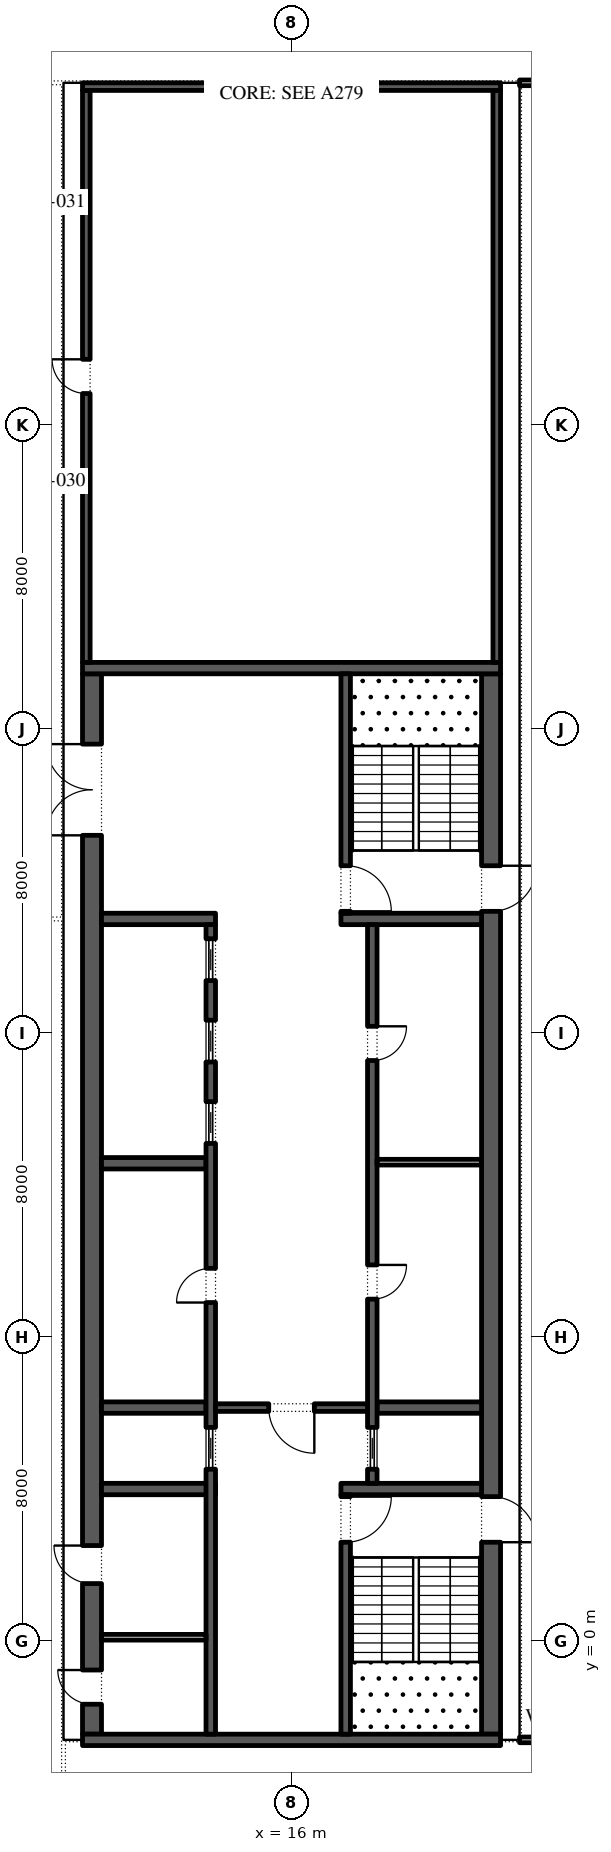
"""IFC4 building model, lengths in metres.
Left out: names, types, materials, properties, quantities, classifications, styles, units other than length and angle.
Written with IfcOpenShell. Run it as: python <this file> out.ifc"""

import sys

from ifc_helpers import new_model, si_unit, direction, frame, frame_2d, origin, place, context, subcontext, project, spatial, rectangle, extrude, element, fill, save


model = new_model("IFC4")
c1 = context("Model", 3, precision=1e-05, world=origin(), true_north=direction((0.0, 1.0)))
c2 = subcontext(c1, "Body", "Model", "MODEL_VIEW")
j1 = project(units=[si_unit("LENGTHUNIT", "METRE"), si_unit("PLANEANGLEUNIT", "RADIAN")], contexts=[c1])
p1 = place(None, origin())
s1 = spatial("IfcSite", under=j1, at=p1, CompositionType="ELEMENT")
p2 = place(p1, origin())
s2 = spatial("IfcBuilding", under=s1, at=p2, CompositionType="ELEMENT")
p3 = place(p2, frame((0.0, 0.0, 346.8)))
s3 = spatial("IfcBuildingStorey", under=s2, at=p3, CompositionType="ELEMENT", Elevation=346.8)
p4 = place(p3, frame((21.25, -2.45, 0.0), z_axis=(0.0, 0.0, 1.0), x_axis=(0.0, 1.0, 0.0)))
e1 = element("IfcWall", 1, at=p4, inside=s3, PredefinedType="SHEAR", context=c2, shape_type="SweptSolid", body=[
    extrude(rectangle(XDim=27.9, YDim=0.5, at=frame_2d((13.95, 0.0))), origin(), (0.0, 0.0, 1.0), 4.0),
])
p5 = place(p4, frame((5.05, 0.0, 0.0)))
e2 = element("IfcOpeningElement", 2, at=p5, cuts=e1, PredefinedType="OPENING", context=c2, shape_type="SweptSolid", body=[
    extrude(rectangle(XDim=1.2, YDim=2.1, at=frame_2d((0.6, 1.05))), frame((0.0, 0.26, 0.0), z_axis=(0.0, -1.0, 0.0), x_axis=(1.0, 0.0, 0.0)), (0.0, 0.0, 1.0), 0.52),
])
p6 = place(p4, frame((21.65, 0.0, 0.0)))
e3 = element("IfcOpeningElement", 3, at=p6, cuts=e1, PredefinedType="OPENING", context=c2, shape_type="SweptSolid", body=[
    extrude(rectangle(XDim=1.2, YDim=2.1, at=frame_2d((0.6, 1.05))), frame((0.0, 0.26, 0.0), z_axis=(0.0, -1.0, 0.0), x_axis=(1.0, 0.0, 0.0)), (0.0, 0.0, 1.0), 0.52),
])
p7 = place(p3, frame((10.75, -2.45, 0.0), z_axis=(0.0, 0.0, 1.0), x_axis=(0.0, 1.0, 0.0)))
e4 = element("IfcWall", 4, at=p7, inside=s3, PredefinedType="SHEAR", context=c2, shape_type="SweptSolid", body=[
    extrude(rectangle(XDim=27.9, YDim=0.5, at=frame_2d((13.95, 0.0))), origin(), (0.0, 0.0, 1.0), 4.0),
])
p8 = place(p7, frame((23.65, 0.0, 0.0)))
e5 = element("IfcOpeningElement", 5, at=p8, cuts=e4, PredefinedType="OPENING", context=c2, shape_type="SweptSolid", body=[
    extrude(rectangle(XDim=2.4, YDim=2.1, at=frame_2d((1.2, 1.05))), frame((0.0, 0.26, 0.0), z_axis=(0.0, -1.0, 0.0), x_axis=(1.0, 0.0, 0.0)), (0.0, 0.0, 1.0), 0.52),
])
p9 = place(p7, frame((0.788, 0.0, 0.0)))
e6 = element("IfcOpeningElement", 6, at=p9, cuts=e4, PredefinedType="OPENING", context=c2, shape_type="SweptSolid", body=[
    extrude(rectangle(XDim=0.9, YDim=2.1, at=frame_2d((0.45, 1.05))), frame((0.0, 0.26, 0.0), z_axis=(0.0, -1.0, 0.0), x_axis=(1.0, 0.0, 0.0)), (0.0, 0.0, 1.0), 0.52),
])
p10 = place(p7, frame((3.962, 0.0, 0.0)))
e7 = element("IfcOpeningElement", 7, at=p10, cuts=e4, PredefinedType="OPENING", context=c2, shape_type="SweptSolid", body=[
    extrude(rectangle(XDim=1.0, YDim=2.1, at=frame_2d((0.5, 1.05))), frame((0.0, 0.26, 0.0), z_axis=(0.0, -1.0, 0.0), x_axis=(1.0, 0.0, 0.0)), (0.0, 0.0, 1.0), 0.52),
])
for number, where, z_axis, x_axis in (
    (8, (10.5, -2.6, 0.0), (0.0, 0.0, 1.0), (1.0, 0.0, 0.0)),
    (9, (10.5, 25.6, 0.0), (0.0, 0.0, 1.0), (1.0, 0.0, 0.0)),
):
    element("IfcWall", number, at=place(p3, frame(where, z_axis=z_axis, x_axis=x_axis)), inside=s3, PredefinedType="SHEAR", context=c2, shape_type="SweptSolid", body=[
        extrude(rectangle(XDim=11.0, YDim=0.3, at=frame_2d((5.5, 0.0))), origin(), (0.0, 0.0, 1.0), 4.0),
    ])
p11 = place(p3, frame((17.3, 4.0, 0.0), z_axis=(0.0, 0.0, 1.0), x_axis=(1.0, 0.0, 0.0)))
e10 = element("IfcWall", 10, at=p11, inside=s3, PredefinedType="SHEAR", context=c2, shape_type="SweptSolid", body=[
    extrude(rectangle(XDim=3.7, YDim=0.3, at=frame_2d((1.85, 0.0))), origin(), (0.0, 0.0, 1.0), 4.0),
])
p12 = place(p3, frame((17.425, -2.45, 0.0), z_axis=(0.0, 0.0, 1.0), x_axis=(0.0, 1.0, 0.0)))
e11 = element("IfcWall", 11, at=p12, inside=s3, PredefinedType="SHEAR", context=c2, shape_type="SweptSolid", body=[
    extrude(rectangle(XDim=6.3, YDim=0.25, at=frame_2d((3.15, 0.0))), origin(), (0.0, 0.0, 1.0), 4.0),
])
p13 = place(p12, frame((5.05, 0.0, 0.0)))
e12 = element("IfcOpeningElement", 12, at=p13, cuts=e11, PredefinedType="OPENING", context=c2, shape_type="SweptSolid", body=[
    extrude(rectangle(XDim=1.2, YDim=2.1, at=frame_2d((0.6, 1.05))), frame((0.0, 0.135, 0.0), z_axis=(0.0, -1.0, 0.0), x_axis=(1.0, 0.0, 0.0)), (0.0, 0.0, 1.0), 0.27),
])
p14 = place(p3, frame((17.3, 19.0, 0.0), z_axis=(0.0, 0.0, 1.0), x_axis=(1.0, 0.0, 0.0)))
e13 = element("IfcWall", 13, at=p14, inside=s3, PredefinedType="SHEAR", context=c2, shape_type="SweptSolid", body=[
    extrude(rectangle(XDim=3.7, YDim=0.3, at=frame_2d((1.85, 0.0))), origin(), (0.0, 0.0, 1.0), 4.0),
])
p15 = place(p3, frame((17.425, 19.15, 0.0), z_axis=(0.0, 0.0, 1.0), x_axis=(0.0, 1.0, 0.0)))
e14 = element("IfcWall", 14, at=p15, inside=s3, PredefinedType="SHEAR", context=c2, shape_type="SweptSolid", body=[
    extrude(rectangle(XDim=6.3, YDim=0.25, at=frame_2d((3.15, 0.0))), origin(), (0.0, 0.0, 1.0), 4.0),
])
p16 = place(p15, frame((0.05, 0.0, 0.0)))
e15 = element("IfcOpeningElement", 15, at=p16, cuts=e14, PredefinedType="OPENING", context=c2, shape_type="SweptSolid", body=[
    extrude(rectangle(XDim=1.2, YDim=2.1, at=frame_2d((0.6, 1.05))), frame((0.0, 0.135, 0.0), z_axis=(0.0, -1.0, 0.0), x_axis=(1.0, 0.0, 0.0)), (0.0, 0.0, 1.0), 0.27),
])
p17 = place(p3, frame((18.25, 6.143, 0.0), z_axis=(0.0, 0.0, 1.0), x_axis=(1.0, 0.0, 0.0)))
e16 = element("IfcWall", 16, at=p17, inside=s3, PredefinedType="SHEAR", context=c2, shape_type="SweptSolid", body=[
    extrude(rectangle(XDim=2.75, YDim=0.3, at=frame_2d((1.375, 0.0))), origin(), (0.0, 0.0, 1.0), 4.0),
])
p18 = place(p3, frame((18.125, 4.15, 0.0), z_axis=(0.0, 0.0, 1.0), x_axis=(0.0, 1.0, 0.0)))
e17 = element("IfcWall", 17, at=p18, inside=s3, PredefinedType="SHEAR", context=c2, shape_type="SweptSolid", body=[
    extrude(rectangle(XDim=14.7, YDim=0.25, at=frame_2d((7.35, 0.0))), origin(), (0.0, 0.0, 1.0), 4.0),
])
p19 = place(p18, frame((4.846, 0.0, 0.0)))
e18 = element("IfcOpeningElement", 18, at=p19, cuts=e17, PredefinedType="OPENING", context=c2, shape_type="SweptSolid", body=[
    extrude(rectangle(XDim=0.9, YDim=2.1, at=frame_2d((0.45, 1.05))), frame((0.0, 0.135, 0.0), z_axis=(0.0, -1.0, 0.0), x_axis=(1.0, 0.0, 0.0)), (0.0, 0.0, 1.0), 0.27),
])
p20 = place(p18, frame((11.125, 0.0, 0.0)))
e19 = element("IfcOpeningElement", 19, at=p20, cuts=e17, PredefinedType="OPENING", context=c2, shape_type="SweptSolid", body=[
    extrude(rectangle(XDim=0.9, YDim=2.1, at=frame_2d((0.45, 1.05))), frame((0.0, 0.135, 0.0), z_axis=(0.0, -1.0, 0.0), x_axis=(1.0, 0.0, 0.0)), (0.0, 0.0, 1.0), 0.27),
])
p21 = place(p18, frame((0.371, 0.0, 0.0)))
e20 = element("IfcOpeningElement", 20, at=p21, cuts=e17, PredefinedType="OPENING", context=c2, shape_type="SweptSolid", body=[
    extrude(rectangle(XDim=1.1, YDim=2.1, at=frame_2d((0.55, 1.05))), frame((0.0, 0.135, 0.0), z_axis=(0.0, -1.0, 0.0), x_axis=(1.0, 0.0, 0.0)), (0.0, 0.0, 1.0), 0.27),
])
p22 = place(p3, frame((18.25, 12.6, 0.0), z_axis=(0.0, 0.0, 1.0), x_axis=(1.0, 0.0, 0.0)))
e21 = element("IfcWall", 21, at=p22, inside=s3, PredefinedType="PARTITIONING", context=c2, shape_type="SweptSolid", body=[
    extrude(rectangle(XDim=2.75, YDim=0.15, at=frame_2d((1.375, 0.0))), origin(), (0.0, 0.0, 1.0), 4.0),
])
p23 = place(p3, frame((11.0, 4.0, 0.0), z_axis=(0.0, 0.0, 1.0), x_axis=(1.0, 0.0, 0.0)))
e22 = element("IfcWall", 22, at=p23, inside=s3, PredefinedType="SHEAR", context=c2, shape_type="SweptSolid", body=[
    extrude(rectangle(XDim=3.0, YDim=0.3, at=frame_2d((1.5, 0.0))), origin(), (0.0, 0.0, 1.0), 4.0),
])
for number, where, z_axis, x_axis in (
    (23, (11.0, 6.143, 0.0), (0.0, 0.0, 1.0), (1.0, 0.0, 0.0)),
    (24, (11.0, 12.571, 0.0), (0.0, 0.0, 1.0), (1.0, 0.0, 0.0)),
):
    element("IfcWall", number, at=place(p3, frame(where, z_axis=z_axis, x_axis=x_axis)), inside=s3, PredefinedType="SHEAR", context=c2, shape_type="SweptSolid", body=[
        extrude(rectangle(XDim=2.75, YDim=0.3, at=frame_2d((1.375, 0.0))), origin(), (0.0, 0.0, 1.0), 4.0),
    ])
p24 = place(p3, frame((11.0, 19.0, 0.0), z_axis=(0.0, 0.0, 1.0), x_axis=(1.0, 0.0, 0.0)))
e25 = element("IfcWall", 25, at=p24, inside=s3, PredefinedType="SHEAR", context=c2, shape_type="SweptSolid", body=[
    extrude(rectangle(XDim=3.0, YDim=0.3, at=frame_2d((1.5, 0.0))), origin(), (0.0, 0.0, 1.0), 4.0),
])
p25 = place(p3, frame((13.875, -2.45, 0.0), z_axis=(0.0, 0.0, 1.0), x_axis=(0.0, 1.0, 0.0)))
e26 = element("IfcWall", 26, at=p25, inside=s3, PredefinedType="SHEAR", context=c2, shape_type="SweptSolid", body=[
    extrude(rectangle(XDim=21.3, YDim=0.25, at=frame_2d((10.65, 0.0))), origin(), (0.0, 0.0, 1.0), 4.0),
])
p26 = place(p25, frame((11.357, 0.0, 0.0)))
e27 = element("IfcOpeningElement", 27, at=p26, cuts=e26, PredefinedType="OPENING", context=c2, shape_type="SweptSolid", body=[
    extrude(rectangle(XDim=0.9, YDim=2.1, at=frame_2d((0.45, 1.05))), frame((0.0, 0.135, 0.0), z_axis=(0.0, -1.0, 0.0), x_axis=(1.0, 0.0, 0.0)), (0.0, 0.0, 1.0), 0.27),
])
p27 = place(p25, frame((6.971, 0.0, 0.0)))
e28 = element("IfcOpeningElement", 28, at=p27, cuts=e26, PredefinedType="OPENING", context=c2, shape_type="SweptSolid", body=[
    extrude(rectangle(XDim=1.1, YDim=2.1, at=frame_2d((0.55, 1.05))), frame((0.0, 0.135, 0.0), z_axis=(0.0, -1.0, 0.0), x_axis=(1.0, 0.0, 0.0)), (0.0, 0.0, 1.0), 0.27),
])
p28 = place(p25, frame((15.543, 0.0, 0.0)))
e29 = element("IfcOpeningElement", 29, at=p28, cuts=e26, PredefinedType="OPENING", context=c2, shape_type="SweptSolid", body=[
    extrude(rectangle(XDim=1.1, YDim=2.1, at=frame_2d((0.55, 1.05))), frame((0.0, 0.135, 0.0), z_axis=(0.0, -1.0, 0.0), x_axis=(1.0, 0.0, 0.0)), (0.0, 0.0, 1.0), 0.27),
])
p29 = place(p25, frame((17.686, 0.0, 0.0)))
e30 = element("IfcOpeningElement", 30, at=p29, cuts=e26, PredefinedType="OPENING", context=c2, shape_type="SweptSolid", body=[
    extrude(rectangle(XDim=1.1, YDim=2.1, at=frame_2d((0.55, 1.05))), frame((0.0, 0.135, 0.0), z_axis=(0.0, -1.0, 0.0), x_axis=(1.0, 0.0, 0.0)), (0.0, 0.0, 1.0), 0.27),
])
p30 = place(p25, frame((19.829, 0.0, 0.0)))
e31 = element("IfcOpeningElement", 31, at=p30, cuts=e26, PredefinedType="OPENING", context=c2, shape_type="SweptSolid", body=[
    extrude(rectangle(XDim=1.1, YDim=2.1, at=frame_2d((0.55, 1.05))), frame((0.0, 0.135, 0.0), z_axis=(0.0, -1.0, 0.0), x_axis=(1.0, 0.0, 0.0)), (0.0, 0.0, 1.0), 0.27),
])
p31 = place(p3, frame((14.0, 6.143, 0.0), z_axis=(0.0, 0.0, 1.0), x_axis=(1.0, 0.0, 0.0)))
e32 = element("IfcWall", 32, at=p31, inside=s3, PredefinedType="SHEAR", context=c2, shape_type="SweptSolid", body=[
    extrude(rectangle(XDim=4.0, YDim=0.2, at=frame_2d((2.0, 0.0))), origin(), (0.0, 0.0, 1.0), 4.0),
])
p32 = place(p31, frame((1.4, 0.0, 0.0)))
e33 = element("IfcOpeningElement", 33, at=p32, cuts=e32, PredefinedType="OPENING", context=c2, shape_type="SweptSolid", body=[
    extrude(rectangle(XDim=1.2, YDim=2.1, at=frame_2d((0.6, 1.05))), frame((0.0, 0.11, 0.0), z_axis=(0.0, -1.0, 0.0), x_axis=(1.0, 0.0, 0.0)), (0.0, 0.0, 1.0), 0.22),
])
p33 = place(p3, frame((11.0, 0.1, 0.0), z_axis=(0.0, 0.0, 1.0), x_axis=(1.0, 0.0, 0.0)))
e34 = element("IfcWall", 34, at=p33, inside=s3, PredefinedType="PARTITIONING", context=c2, shape_type="SweptSolid", body=[
    extrude(rectangle(XDim=2.75, YDim=0.15, at=frame_2d((1.375, 0.0))), origin(), (0.0, 0.0, 1.0), 4.0),
])
p34 = place(p3, frame((21.4, 25.75, 0.0), z_axis=(0.0, 0.0, 1.0), x_axis=(0.0, 1.0, 0.0)))
e35 = element("IfcWall", 35, at=p34, inside=s3, PredefinedType="SHEAR", context=c2, shape_type="SweptSolid", body=[
    extrude(rectangle(XDim=15.05, YDim=0.2, at=frame_2d((7.525, 0.0))), origin(), (0.0, 0.0, 1.0), 4.0),
])
p35 = place(p3, frame((10.6, 25.75, 0.0), z_axis=(0.0, 0.0, 1.0), x_axis=(0.0, 1.0, 0.0)))
e36 = element("IfcWall", 36, at=p35, inside=s3, PredefinedType="SHEAR", context=c2, shape_type="SweptSolid", body=[
    extrude(rectangle(XDim=15.05, YDim=0.2, at=frame_2d((7.525, 0.0))), origin(), (0.0, 0.0, 1.0), 4.0),
])
p36 = place(p35, frame((7.075, 0.0, 0.0)))
e37 = element("IfcOpeningElement", 37, at=p36, cuts=e36, PredefinedType="OPENING", context=c2, shape_type="SweptSolid", body=[
    extrude(rectangle(XDim=0.9, YDim=2.1, at=frame_2d((0.45, 1.05))), frame((0.0, 0.11, 0.0), z_axis=(0.0, -1.0, 0.0), x_axis=(1.0, 0.0, 0.0)), (0.0, 0.0, 1.0), 0.22),
])
p37 = place(p3, frame((10.5, 40.9, 0.0), z_axis=(0.0, 0.0, 1.0), x_axis=(1.0, 0.0, 0.0)))
e38 = element("IfcWall", 38, at=p37, inside=s3, PredefinedType="SHEAR", context=c2, shape_type="SweptSolid", body=[
    extrude(rectangle(XDim=11.0, YDim=0.2, at=frame_2d((5.5, 0.0))), origin(), (0.0, 0.0, 1.0), 4.0),
])
p38 = place(p3, frame((22.0, -2.6, 0.0), z_axis=(0.0, 0.0, 1.0), x_axis=(1.0, 0.0, 0.0)))
e39 = element("IfcWall", 39, at=p38, inside=s3, PredefinedType="PARTITIONING", context=c2, shape_type="SweptSolid", body=[
    extrude(rectangle(XDim=2.25, YDim=0.15, at=frame_2d((1.125, 0.0))), origin(), (0.0, 0.0, 1.0), 4.0),
])
p39 = place(p3, frame((26.05, 41.0, 0.0), z_axis=(0.0, 0.0, 1.0), x_axis=(-1.0, 0.0, 0.0)))
e40 = element("IfcWall", 40, at=p39, inside=s3, PredefinedType="PARTITIONING", context=c2, shape_type="SweptSolid", body=[
    extrude(rectangle(XDim=4.05, YDim=0.15, at=frame_2d((2.025, 0.0))), origin(), (0.0, 0.0, 1.0), 4.0),
])
p40 = place(p39, frame((1.9, 0.0, 0.0)))
e41 = element("IfcOpeningElement", 41, at=p40, cuts=e40, PredefinedType="OPENING", context=c2, shape_type="SweptSolid", body=[
    extrude(rectangle(XDim=1.0, YDim=2.1, at=frame_2d((0.5, 1.05))), frame((0.0, 0.085, 0.0), z_axis=(0.0, -1.0, 0.0), x_axis=(1.0, 0.0, 0.0)), (0.0, 0.0, 1.0), 0.17),
])
p41 = place(p19, frame((0.9, -0.2, 0.0), z_axis=(0.0, 0.0, 1.0), x_axis=(-1.0, 0.0, 0.0)))
e42 = element("IfcDoor", 42, at=p41, inside=s3, OperationType="SINGLE_SWING_RIGHT", PredefinedType="DOOR", context=c2, shape_type="SweptSolid", body=[
    extrude(rectangle(XDim=0.9, YDim=2.1, at=frame_2d((0.45, 1.05))), frame((0.0, -0.075, 0.0), z_axis=(0.0, -1.0, 0.0), x_axis=(1.0, 0.0, 0.0)), (0.0, 0.0, 1.0), 0.05),
])
fill(e18, e42)
p42 = place(p20, frame((0.9, -0.2, 0.0), z_axis=(0.0, 0.0, 1.0), x_axis=(-1.0, 0.0, 0.0)))
e43 = element("IfcDoor", 43, at=p42, inside=s3, OperationType="SINGLE_SWING_RIGHT", PredefinedType="DOOR", context=c2, shape_type="SweptSolid", body=[
    extrude(rectangle(XDim=0.9, YDim=2.1, at=frame_2d((0.45, 1.05))), frame((0.0, -0.075, 0.0), z_axis=(0.0, -1.0, 0.0), x_axis=(1.0, 0.0, 0.0)), (0.0, 0.0, 1.0), 0.05),
])
fill(e19, e43)
p43 = place(p21, origin())
e44 = element("IfcDoor", 44, at=p43, inside=s3, OperationType="SLIDING_TO_LEFT", PredefinedType="DOOR", context=c2, shape_type="SweptSolid", body=[
    extrude(rectangle(XDim=1.1, YDim=2.1, at=frame_2d((0.55, 1.05))), frame((0.0, 0.025, 0.0), z_axis=(0.0, -1.0, 0.0), x_axis=(1.0, 0.0, 0.0)), (0.0, 0.0, 1.0), 0.05),
])
fill(e20, e44)
p44 = place(p26, origin())
e45 = element("IfcDoor", 45, at=p44, inside=s3, OperationType="SINGLE_SWING_RIGHT", PredefinedType="DOOR", context=c2, shape_type="SweptSolid", body=[
    extrude(rectangle(XDim=0.9, YDim=2.1, at=frame_2d((0.45, 1.05))), frame((0.0, 0.125, 0.0), z_axis=(0.0, -1.0, 0.0), x_axis=(1.0, 0.0, 0.0)), (0.0, 0.0, 1.0), 0.05),
])
fill(e27, e45)
p45 = place(p27, origin())
e46 = element("IfcDoor", 46, at=p45, inside=s3, OperationType="SLIDING_TO_LEFT", PredefinedType="DOOR", context=c2, shape_type="SweptSolid", body=[
    extrude(rectangle(XDim=1.1, YDim=2.1, at=frame_2d((0.55, 1.05))), frame((0.0, 0.025, 0.0), z_axis=(0.0, -1.0, 0.0), x_axis=(1.0, 0.0, 0.0)), (0.0, 0.0, 1.0), 0.05),
])
fill(e28, e46)
p46 = place(p28, origin())
e47 = element("IfcDoor", 47, at=p46, inside=s3, OperationType="SLIDING_TO_LEFT", PredefinedType="DOOR", context=c2, shape_type="SweptSolid", body=[
    extrude(rectangle(XDim=1.1, YDim=2.1, at=frame_2d((0.55, 1.05))), frame((0.0, 0.025, 0.0), z_axis=(0.0, -1.0, 0.0), x_axis=(1.0, 0.0, 0.0)), (0.0, 0.0, 1.0), 0.05),
])
fill(e29, e47)
p47 = place(p29, origin())
e48 = element("IfcDoor", 48, at=p47, inside=s3, OperationType="SLIDING_TO_LEFT", PredefinedType="DOOR", context=c2, shape_type="SweptSolid", body=[
    extrude(rectangle(XDim=1.1, YDim=2.1, at=frame_2d((0.55, 1.05))), frame((0.0, 0.025, 0.0), z_axis=(0.0, -1.0, 0.0), x_axis=(1.0, 0.0, 0.0)), (0.0, 0.0, 1.0), 0.05),
])
fill(e30, e48)
p48 = place(p30, origin())
e49 = element("IfcDoor", 49, at=p48, inside=s3, OperationType="SLIDING_TO_LEFT", PredefinedType="DOOR", context=c2, shape_type="SweptSolid", body=[
    extrude(rectangle(XDim=1.1, YDim=2.1, at=frame_2d((0.55, 1.05))), frame((0.0, 0.025, 0.0), z_axis=(0.0, -1.0, 0.0), x_axis=(1.0, 0.0, 0.0)), (0.0, 0.0, 1.0), 0.05),
])
fill(e31, e49)
p49 = place(p32, frame((1.2, 0.0, 0.0), z_axis=(0.0, 0.0, 1.0), x_axis=(-1.0, 0.0, 0.0)))
e50 = element("IfcDoor", 50, at=p49, inside=s3, OperationType="SINGLE_SWING_RIGHT", PredefinedType="DOOR", context=c2, shape_type="SweptSolid", body=[
    extrude(rectangle(XDim=1.2, YDim=2.1, at=frame_2d((0.6, 1.05))), frame((0.0, 0.025, 0.0), z_axis=(0.0, -1.0, 0.0), x_axis=(1.0, 0.0, 0.0)), (0.0, 0.0, 1.0), 0.05),
])
fill(e33, e50)
p50 = place(p8, origin())
e51 = element("IfcDoor", 51, at=p50, inside=s3, OperationType="DOUBLE_DOOR_SINGLE_SWING", PredefinedType="DOOR", context=c2, shape_type="SweptSolid", body=[
    extrude(rectangle(XDim=2.4, YDim=2.1, at=frame_2d((1.2, 1.05))), frame((0.0, 0.025, 0.0), z_axis=(0.0, -1.0, 0.0), x_axis=(1.0, 0.0, 0.0)), (0.0, 0.0, 1.0), 0.05),
])
fill(e5, e51)
p51 = place(p13, frame((1.2, 0.0, 0.0), z_axis=(0.0, 0.0, 1.0), x_axis=(-1.0, 0.0, 0.0)))
e52 = element("IfcDoor", 52, at=p51, inside=s3, OperationType="SINGLE_SWING_RIGHT", PredefinedType="DOOR", context=c2, shape_type="SweptSolid", body=[
    extrude(rectangle(XDim=1.2, YDim=2.1, at=frame_2d((0.6, 1.05))), frame((0.0, 0.025, 0.0), z_axis=(0.0, -1.0, 0.0), x_axis=(1.0, 0.0, 0.0)), (0.0, 0.0, 1.0), 0.05),
])
fill(e12, e52)
p52 = place(p5, frame((1.2, 0.0, 0.0), z_axis=(0.0, 0.0, 1.0), x_axis=(-1.0, 0.0, 0.0)))
e53 = element("IfcDoor", 53, at=p52, inside=s3, OperationType="SINGLE_SWING_LEFT", PredefinedType="DOOR", context=c2, shape_type="SweptSolid", body=[
    extrude(rectangle(XDim=1.2, YDim=2.1, at=frame_2d((0.6, 1.05))), frame((0.0, 0.025, 0.0), z_axis=(0.0, -1.0, 0.0), x_axis=(1.0, 0.0, 0.0)), (0.0, 0.0, 1.0), 0.05),
])
fill(e2, e53)
p53 = place(p16, frame((1.2, 0.0, 0.0), z_axis=(0.0, 0.0, 1.0), x_axis=(-1.0, 0.0, 0.0)))
e54 = element("IfcDoor", 54, at=p53, inside=s3, OperationType="SINGLE_SWING_LEFT", PredefinedType="DOOR", context=c2, shape_type="SweptSolid", body=[
    extrude(rectangle(XDim=1.2, YDim=2.1, at=frame_2d((0.6, 1.05))), frame((0.0, 0.025, 0.0), z_axis=(0.0, -1.0, 0.0), x_axis=(1.0, 0.0, 0.0)), (0.0, 0.0, 1.0), 0.05),
])
fill(e15, e54)
p54 = place(p6, frame((1.2, 0.0, 0.0), z_axis=(0.0, 0.0, 1.0), x_axis=(-1.0, 0.0, 0.0)))
e55 = element("IfcDoor", 55, at=p54, inside=s3, OperationType="SINGLE_SWING_RIGHT", PredefinedType="DOOR", context=c2, shape_type="SweptSolid", body=[
    extrude(rectangle(XDim=1.2, YDim=2.1, at=frame_2d((0.6, 1.05))), frame((0.0, 0.025, 0.0), z_axis=(0.0, -1.0, 0.0), x_axis=(1.0, 0.0, 0.0)), (0.0, 0.0, 1.0), 0.05),
])
fill(e3, e55)
p55 = place(p9, origin())
e56 = element("IfcDoor", 56, at=p55, inside=s3, OperationType="SINGLE_SWING_LEFT", PredefinedType="DOOR", context=c2, shape_type="SweptSolid", body=[
    extrude(rectangle(XDim=0.9, YDim=2.1, at=frame_2d((0.45, 1.05))), frame((0.0, -0.2, 0.0), z_axis=(0.0, -1.0, 0.0), x_axis=(1.0, 0.0, 0.0)), (0.0, 0.0, 1.0), 0.05),
])
fill(e6, e56)
p56 = place(p10, origin())
e57 = element("IfcDoor", 57, at=p56, inside=s3, OperationType="SINGLE_SWING_LEFT", PredefinedType="DOOR", context=c2, shape_type="SweptSolid", body=[
    extrude(rectangle(XDim=1.0, YDim=2.1, at=frame_2d((0.5, 1.05))), frame((0.0, -0.2, 0.0), z_axis=(0.0, -1.0, 0.0), x_axis=(1.0, 0.0, 0.0)), (0.0, 0.0, 1.0), 0.05),
])
fill(e7, e57)
p57 = place(p36, origin())
e58 = element("IfcDoor", 58, at=p57, inside=s3, OperationType="SINGLE_SWING_LEFT", PredefinedType="DOOR", context=c2, shape_type="SweptSolid", body=[
    extrude(rectangle(XDim=0.9, YDim=2.1, at=frame_2d((0.45, 1.05))), frame((0.0, -0.05, 0.0), z_axis=(0.0, -1.0, 0.0), x_axis=(1.0, 0.0, 0.0)), (0.0, 0.0, 1.0), 0.05),
])
fill(e37, e58)
save(model, sys.argv[1])
